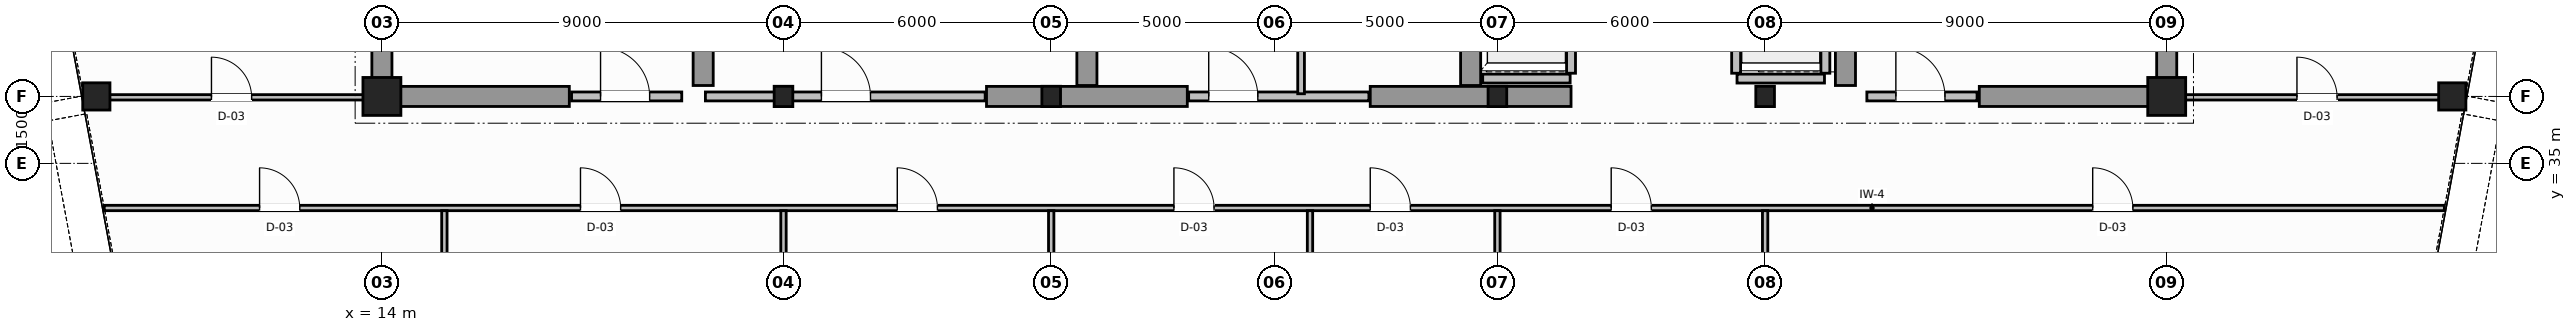
"""IFC4 building model, lengths in metres.
Left out: names, types, materials, properties, quantities, classifications, styles, units other than length and angle.
Written with IfcOpenShell. Run it as: python <this file> out.ifc"""

import sys

from ifc_helpers import new_model, si_unit, direction, frame, frame_2d, origin, origin_2d, place, context, subcontext, project, spatial, rectangle, hollow_circle, i_section, extrude, source, transform, mapped, element, fill, save


model = new_model("IFC4")
c1 = context("Model", 3, precision=1e-05, world=origin(), true_north=direction((0.0, 1.0)))
c2 = subcontext(c1, "Body", "Model", "MODEL_VIEW")
j1 = project(units=[si_unit("LENGTHUNIT", "METRE"), si_unit("PLANEANGLEUNIT", "RADIAN")], contexts=[c1])
p1 = place(None, origin())
s1 = spatial("IfcSite", under=j1, at=p1, CompositionType="ELEMENT")
p2 = place(p1, origin())
s2 = spatial("IfcBuilding", under=s1, at=p2, CompositionType="ELEMENT")
p3 = place(p2, frame((0.0, 0.0, 265.0)))
s3 = spatial("IfcBuildingStorey", under=s2, at=p3, CompositionType="ELEMENT", Elevation=265.0)
m1 = source(origin(), c2, "Body", "SweptSolid", [
    extrude(rectangle(XDim=0.85, YDim=0.85, at=origin_2d()), origin(), (0.0, 0.0, 1.0), 3.8),
])
p4 = place(p3, frame((14.0, 36.5, 0.0), z_axis=(0.0, 0.0, 1.0), x_axis=(1.0, 0.0, 0.0)))
e1 = element("IfcColumn", 1, at=p4, inside=s3, PredefinedType="COLUMN", context=c2, shape_type="MappedRepresentation", body=[
    mapped(m1, transform((0.0, 0.0, 0.0), scale=1.0)),
])
m2 = source(origin(), c2, "Body", "SweptSolid", [
    extrude(i_section(OverallWidth=0.418, OverallDepth=0.455, WebThickness=0.042, FlangeThickness=0.058, FilletRadius=0.015, at=origin_2d()), origin(), (0.0, 0.0, 1.0), 3.8),
])
for number, where, z_axis, x_axis in (
    (2, (23.0, 36.5, 0.0), (0.0, 0.0, 1.0), (1.0, 0.0, 0.0)),
    (3, (29.0, 36.5, 0.0), (0.0, 0.0, 1.0), (1.0, 0.0, 0.0)),
    (4, (39.0, 36.5, 0.0), (0.0, 0.0, 1.0), (1.0, 0.0, 0.0)),
    (5, (45.0, 36.5, 0.0), (0.0, 0.0, 1.0), (1.0, 0.0, 0.0)),
):
    element("IfcColumn", number, at=place(p3, frame(where, z_axis=z_axis, x_axis=x_axis)), inside=s3, PredefinedType="COLUMN", context=c2, shape_type="MappedRepresentation", body=[
        mapped(m2, transform((0.0, 0.0, 0.0), scale=1.0)),
    ])
p5 = place(p3, frame((54.0, 36.5, 0.0), z_axis=(0.0, 0.0, 1.0), x_axis=(1.0, 0.0, 0.0)))
e6 = element("IfcColumn", 6, at=p5, inside=s3, PredefinedType="COLUMN", context=c2, shape_type="MappedRepresentation", body=[
    mapped(m1, transform((0.0, 0.0, 0.0), scale=1.0)),
])
m3 = source(origin(), c2, "Body", "SweptSolid", [
    extrude(hollow_circle(Radius=0.305, WallThickness=0.03, at=origin_2d()), origin(), (0.0, 0.0, 1.0), 3.8),
])
for number, where, z_axis, x_axis in (
    (7, (7.6, 36.5, 0.0), (0.0, 0.0, 1.0), (1.0, 0.0, 0.0)),
    (8, (60.4, 36.5, 0.0), (0.0, 0.0, 1.0), (1.0, 0.0, 0.0)),
):
    element("IfcColumn", number, at=place(p3, frame(where, z_axis=z_axis, x_axis=x_axis)), inside=s3, PredefinedType="COLUMN", context=c2, shape_type="MappedRepresentation", body=[
        mapped(m3, transform((0.0, 0.0, 0.0), scale=1.0)),
    ])
for number, where, z_axis, x_axis in (
    (9, (14.0, 36.5, 0.0), (0.0, 0.0, 1.0), (0.0, 1.0, 0.0)),
    (10, (54.0, 36.5, 0.0), (0.0, 0.0, 1.0), (0.0, 1.0, 0.0)),
):
    element("IfcWall", number, at=place(p3, frame(where, z_axis=z_axis, x_axis=x_axis)), inside=s3, PredefinedType="SHEAR", context=c2, shape_type="SweptSolid", body=[
        extrude(rectangle(XDim=14.5, YDim=0.45, at=frame_2d((7.25, 0.0))), origin(), (0.0, 0.0, 1.0), 3.8),
    ])
p6 = place(p3, frame((14.245, 36.5, 0.0), z_axis=(0.0, 0.0, 1.0), x_axis=(1.0, 0.0, 0.0)))
e11 = element("IfcWall", 11, at=p6, inside=s3, PredefinedType="SHEAR", context=c2, shape_type="SweptSolid", body=[
    extrude(rectangle(XDim=3.955, YDim=0.45, at=frame_2d((1.978, 0.0))), origin(), (0.0, 0.0, 1.0), 2.58),
])
for number, where, z_axis, x_axis in (
    (12, (27.55, 36.5, 0.0), (0.0, 0.0, 1.0), (1.0, 0.0, 0.0)),
    (13, (36.15, 36.5, 0.0), (0.0, 0.0, 1.0), (1.0, 0.0, 0.0)),
):
    element("IfcWall", number, at=place(p3, frame(where, z_axis=z_axis, x_axis=x_axis)), inside=s3, PredefinedType="SHEAR", context=c2, shape_type="SweptSolid", body=[
        extrude(rectangle(XDim=4.5, YDim=0.45, at=frame_2d((2.25, 0.0))), origin(), (0.0, 0.0, 1.0), 3.8),
    ])
p7 = place(p3, frame((49.8, 36.5, 0.0), z_axis=(0.0, 0.0, 1.0), x_axis=(1.0, 0.0, 0.0)))
e14 = element("IfcWall", 14, at=p7, inside=s3, PredefinedType="SHEAR", context=c2, shape_type="SweptSolid", body=[
    extrude(rectangle(XDim=3.955, YDim=0.45, at=frame_2d((1.978, 0.0))), origin(), (0.0, 0.0, 1.0), 2.58),
])
for number, where, z_axis, x_axis in (
    (15, (21.2, 36.745, 0.0), (0.0, 0.0, 1.0), (0.0, 1.0, 0.0)),
    (16, (29.8, 36.745, 0.0), (0.0, 0.0, 1.0), (0.0, 1.0, 0.0)),
    (17, (38.4, 36.745, 0.0), (0.0, 0.0, 1.0), (0.0, 1.0, 0.0)),
    (18, (46.8, 36.745, 0.0), (0.0, 0.0, 1.0), (0.0, 1.0, 0.0)),
):
    element("IfcWall", number, at=place(p3, frame(where, z_axis=z_axis, x_axis=x_axis)), inside=s3, PredefinedType="SHEAR", context=c2, shape_type="SweptSolid", body=[
        extrude(rectangle(XDim=9.455, YDim=0.45, at=frame_2d((4.728, 0.0))), origin(), (0.0, 0.0, 1.0), 3.8),
    ])
p8 = place(p3, frame((18.25, 36.5, 0.0), z_axis=(0.0, 0.0, 1.0), x_axis=(1.0, 0.0, 0.0)))
e19 = element("IfcWall", 19, at=p8, inside=s3, PredefinedType="SOLIDWALL", context=c2, shape_type="SweptSolid", body=[
    extrude(rectangle(XDim=2.47, YDim=0.2, at=frame_2d((1.235, 0.0))), origin(), (0.0, 0.0, 1.0), 2.57),
])
p9 = place(p8, frame((0.65, 0.0, 0.0)))
e20 = element("IfcOpeningElement", 20, at=p9, cuts=e19, PredefinedType="OPENING", context=c2, shape_type="SweptSolid", body=[
    extrude(rectangle(XDim=1.1, YDim=2.15, at=frame_2d((0.55, 1.075))), frame((0.0, 0.11, 0.0), z_axis=(0.0, -1.0, 0.0), x_axis=(1.0, 0.0, 0.0)), (0.0, 0.0, 1.0), 0.22),
])
p10 = place(p3, frame((47.28, 36.5, 0.0), z_axis=(0.0, 0.0, 1.0), x_axis=(1.0, 0.0, 0.0)))
e21 = element("IfcWall", 21, at=p10, inside=s3, PredefinedType="SOLIDWALL", context=c2, shape_type="SweptSolid", body=[
    extrude(rectangle(XDim=2.47, YDim=0.2, at=frame_2d((1.235, 0.0))), origin(), (0.0, 0.0, 1.0), 2.57),
])
p11 = place(p10, frame((0.65, 0.0, 0.0)))
e22 = element("IfcOpeningElement", 22, at=p11, cuts=e21, PredefinedType="OPENING", context=c2, shape_type="SweptSolid", body=[
    extrude(rectangle(XDim=1.1, YDim=2.15, at=frame_2d((0.55, 1.075))), frame((0.0, 0.11, 0.0), z_axis=(0.0, -1.0, 0.0), x_axis=(1.0, 0.0, 0.0)), (0.0, 0.0, 1.0), 0.22),
])
p12 = place(p3, frame((38.67, 36.9, 0.0), z_axis=(0.0, 0.0, 1.0), x_axis=(1.0, 0.0, 0.0)))
e23 = element("IfcWall", 23, at=p12, inside=s3, PredefinedType="SOLIDWALL", context=c2, shape_type="SweptSolid", body=[
    extrude(rectangle(XDim=1.96, YDim=0.2, at=frame_2d((0.98, 0.0))), origin(), (0.0, 0.0, 1.0), 2.37),
])
p13 = place(p3, frame((40.65, 37.02, 0.0), z_axis=(0.0, 0.0, 1.0), x_axis=(0.0, 1.0, 0.0)))
e24 = element("IfcWall", 24, at=p13, inside=s3, PredefinedType="SOLIDWALL", context=c2, shape_type="SweptSolid", body=[
    extrude(rectangle(XDim=2.56, YDim=0.2, at=frame_2d((1.28, 0.0))), origin(), (0.0, 0.0, 1.0), 3.58),
])
p14 = place(p3, frame((44.37, 36.9, 0.0), z_axis=(0.0, 0.0, 1.0), x_axis=(1.0, 0.0, 0.0)))
e25 = element("IfcWall", 25, at=p14, inside=s3, PredefinedType="SOLIDWALL", context=c2, shape_type="SweptSolid", body=[
    extrude(rectangle(XDim=1.96, YDim=0.2, at=frame_2d((0.98, 0.0))), origin(), (0.0, 0.0, 1.0), 2.37),
])
for number, where, z_axis, x_axis in (
    (26, (44.35, 37.02, 0.0), (0.0, 0.0, 1.0), (0.0, 1.0, 0.0)),
    (27, (46.35, 37.02, 0.0), (0.0, 0.0, 1.0), (0.0, 1.0, 0.0)),
):
    element("IfcWall", number, at=place(p3, frame(where, z_axis=z_axis, x_axis=x_axis)), inside=s3, PredefinedType="SOLIDWALL", context=c2, shape_type="SweptSolid", body=[
        extrude(rectangle(XDim=2.56, YDim=0.2, at=frame_2d((1.28, 0.0))), origin(), (0.0, 0.0, 1.0), 3.58),
    ])
p15 = place(p3, frame((21.25, 36.5, 0.0), z_axis=(0.0, 0.0, 1.0), x_axis=(1.0, 0.0, 0.0)))
e28 = element("IfcWall", 28, at=p15, inside=s3, PredefinedType="SOLIDWALL", context=c2, shape_type="SweptSolid", body=[
    extrude(rectangle(XDim=6.27, YDim=0.2, at=frame_2d((3.135, 0.0))), origin(), (0.0, 0.0, 1.0), 2.37),
])
p16 = place(p15, frame((2.6, 0.0, 0.0)))
e29 = element("IfcOpeningElement", 29, at=p16, cuts=e28, PredefinedType="OPENING", context=c2, shape_type="SweptSolid", body=[
    extrude(rectangle(XDim=1.1, YDim=2.15, at=frame_2d((0.55, 1.075))), frame((0.0, 0.11, 0.0), z_axis=(0.0, -1.0, 0.0), x_axis=(1.0, 0.0, 0.0)), (0.0, 0.0, 1.0), 0.22),
])
p17 = place(p3, frame((32.08, 36.5, 0.0), z_axis=(0.0, 0.0, 1.0), x_axis=(1.0, 0.0, 0.0)))
e30 = element("IfcWall", 30, at=p17, inside=s3, PredefinedType="SOLIDWALL", context=c2, shape_type="SweptSolid", body=[
    extrude(rectangle(XDim=4.04, YDim=0.2, at=frame_2d((2.02, 0.0))), origin(), (0.0, 0.0, 1.0), 2.37),
])
p18 = place(p17, frame((0.45, 0.0, 0.0)))
e31 = element("IfcOpeningElement", 31, at=p18, cuts=e30, PredefinedType="OPENING", context=c2, shape_type="SweptSolid", body=[
    extrude(rectangle(XDim=1.1, YDim=2.15, at=frame_2d((0.55, 1.075))), frame((0.0, 0.11, 0.0), z_axis=(0.0, -1.0, 0.0), x_axis=(1.0, 0.0, 0.0)), (0.0, 0.0, 1.0), 0.22),
])
p19 = place(p3, frame((34.6, 36.56, 0.0), z_axis=(0.0, 0.0, 1.0), x_axis=(0.0, 1.0, 0.0)))
e32 = element("IfcWall", 32, at=p19, inside=s3, PredefinedType="PARTITIONING", context=c2, shape_type="SweptSolid", body=[
    extrude(rectangle(XDim=9.58, YDim=0.15, at=frame_2d((4.79, 0.0))), origin(), (0.0, 0.0, 1.0), 3.58),
])
p20 = place(p19, frame((4.2, 0.0, 0.0)))
e33 = element("IfcOpeningElement", 33, at=p20, cuts=e32, PredefinedType="OPENING", context=c2, shape_type="SweptSolid", body=[
    extrude(rectangle(XDim=0.9, YDim=2.1, at=frame_2d((0.45, 1.05))), frame((0.0, 0.085, 0.0), z_axis=(0.0, -1.0, 0.0), x_axis=(1.0, 0.0, 0.0)), (0.0, 0.0, 1.0), 0.17),
])
p21 = place(p3, frame((7.777, 34.0, 0.0), z_axis=(0.0, 0.0, 1.0), x_axis=(1.0, 0.0, 0.0)))
e34 = element("IfcWall", 34, at=p21, inside=s3, PredefinedType="PARTITIONING", context=c2, shape_type="SweptSolid", body=[
    extrude(rectangle(XDim=52.446, YDim=0.12, at=frame_2d((26.223, 0.0))), origin(), (0.0, 0.0, 1.0), 3.58),
])
p22 = place(p21, frame((3.481, 0.0, 0.0)))
e35 = element("IfcOpeningElement", 35, at=p22, cuts=e34, PredefinedType="OPENING", context=c2, shape_type="SweptSolid", body=[
    extrude(rectangle(XDim=0.9, YDim=2.15, at=frame_2d((0.45, 1.075))), frame((0.0, 0.07, 0.0), z_axis=(0.0, -1.0, 0.0), x_axis=(1.0, 0.0, 0.0)), (0.0, 0.0, 1.0), 0.14),
])
p23 = place(p21, frame((10.673, 0.0, 0.0)))
e36 = element("IfcOpeningElement", 36, at=p23, cuts=e34, PredefinedType="OPENING", context=c2, shape_type="SweptSolid", body=[
    extrude(rectangle(XDim=0.9, YDim=2.15, at=frame_2d((0.45, 1.075))), frame((0.0, 0.07, 0.0), z_axis=(0.0, -1.0, 0.0), x_axis=(1.0, 0.0, 0.0)), (0.0, 0.0, 1.0), 0.14),
])
p24 = place(p21, frame((17.773, 0.0, 0.0)))
e37 = element("IfcOpeningElement", 37, at=p24, cuts=e34, PredefinedType="OPENING", context=c2, shape_type="SweptSolid", body=[
    extrude(rectangle(XDim=0.9, YDim=2.15, at=frame_2d((0.45, 1.075))), frame((0.0, 0.07, 0.0), z_axis=(0.0, -1.0, 0.0), x_axis=(1.0, 0.0, 0.0)), (0.0, 0.0, 1.0), 0.14),
])
p25 = place(p21, frame((23.973, 0.0, 0.0)))
e38 = element("IfcOpeningElement", 38, at=p25, cuts=e34, PredefinedType="OPENING", context=c2, shape_type="SweptSolid", body=[
    extrude(rectangle(XDim=0.9, YDim=2.15, at=frame_2d((0.45, 1.075))), frame((0.0, 0.07, 0.0), z_axis=(0.0, -1.0, 0.0), x_axis=(1.0, 0.0, 0.0)), (0.0, 0.0, 1.0), 0.14),
])
p26 = place(p21, frame((28.373, 0.0, 0.0)))
e39 = element("IfcOpeningElement", 39, at=p26, cuts=e34, PredefinedType="OPENING", context=c2, shape_type="SweptSolid", body=[
    extrude(rectangle(XDim=0.9, YDim=2.15, at=frame_2d((0.45, 1.075))), frame((0.0, 0.07, 0.0), z_axis=(0.0, -1.0, 0.0), x_axis=(1.0, 0.0, 0.0)), (0.0, 0.0, 1.0), 0.14),
])
p27 = place(p21, frame((33.773, 0.0, 0.0)))
e40 = element("IfcOpeningElement", 40, at=p27, cuts=e34, PredefinedType="OPENING", context=c2, shape_type="SweptSolid", body=[
    extrude(rectangle(XDim=0.9, YDim=2.15, at=frame_2d((0.45, 1.075))), frame((0.0, 0.07, 0.0), z_axis=(0.0, -1.0, 0.0), x_axis=(1.0, 0.0, 0.0)), (0.0, 0.0, 1.0), 0.14),
])
p28 = place(p21, frame((44.564, 0.0, 0.0)))
e41 = element("IfcOpeningElement", 41, at=p28, cuts=e34, PredefinedType="OPENING", context=c2, shape_type="SweptSolid", body=[
    extrude(rectangle(XDim=0.9, YDim=2.15, at=frame_2d((0.45, 1.075))), frame((0.0, 0.07, 0.0), z_axis=(0.0, -1.0, 0.0), x_axis=(1.0, 0.0, 0.0)), (0.0, 0.0, 1.0), 0.14),
])
p29 = place(p3, frame((7.321, 36.48, 0.0), z_axis=(0.0, 0.0, 1.0), x_axis=(1.0, 0.0, 0.0)))
e42 = element("IfcWall", 42, at=p29, inside=s3, PredefinedType="PARTITIONING", context=c2, shape_type="SweptSolid", body=[
    extrude(rectangle(XDim=6.619, YDim=0.12, at=frame_2d((3.31, 0.0))), origin(), (0.0, 0.0, 1.0), 2.37),
])
p30 = place(p29, frame((2.859, 0.0, 0.0)))
e43 = element("IfcOpeningElement", 43, at=p30, cuts=e42, PredefinedType="OPENING", context=c2, shape_type="SweptSolid", body=[
    extrude(rectangle(XDim=0.9, YDim=2.15, at=frame_2d((0.45, 1.075))), frame((0.0, 0.07, 0.0), z_axis=(0.0, -1.0, 0.0), x_axis=(1.0, 0.0, 0.0)), (0.0, 0.0, 1.0), 0.14),
])
p31 = place(p3, frame((54.06, 36.48, 0.0), z_axis=(0.0, 0.0, 1.0), x_axis=(1.0, 0.0, 0.0)))
e44 = element("IfcWall", 44, at=p31, inside=s3, PredefinedType="PARTITIONING", context=c2, shape_type="SweptSolid", body=[
    extrude(rectangle(XDim=6.619, YDim=0.12, at=frame_2d((3.31, 0.0))), origin(), (0.0, 0.0, 1.0), 2.37),
])
p32 = place(p31, frame((2.859, 0.0, 0.0)))
e45 = element("IfcOpeningElement", 45, at=p32, cuts=e44, PredefinedType="OPENING", context=c2, shape_type="SweptSolid", body=[
    extrude(rectangle(XDim=0.9, YDim=2.15, at=frame_2d((0.45, 1.075))), frame((0.0, 0.07, 0.0), z_axis=(0.0, -1.0, 0.0), x_axis=(1.0, 0.0, 0.0)), (0.0, 0.0, 1.0), 0.14),
])
for number, where, z_axis, x_axis in (
    (46, (23.0, 28.14, 0.0), (0.0, 0.0, 1.0), (0.0, 1.0, 0.0)),
    (47, (29.0, 28.14, 0.0), (0.0, 0.0, 1.0), (0.0, 1.0, 0.0)),
    (48, (39.0, 28.14, 0.0), (0.0, 0.0, 1.0), (0.0, 1.0, 0.0)),
    (49, (45.0, 28.14, 0.0), (0.0, 0.0, 1.0), (0.0, 1.0, 0.0)),
):
    element("IfcWall", number, at=place(p3, frame(where, z_axis=z_axis, x_axis=x_axis)), inside=s3, PredefinedType="PARTITIONING", context=c2, shape_type="SweptSolid", body=[
        extrude(rectangle(XDim=5.8, YDim=0.12, at=frame_2d((2.9, 0.0))), origin(), (0.0, 0.0, 1.0), 2.37),
    ])
p33 = place(p3, frame((15.4, 18.64, 0.0), z_axis=(0.0, 0.0, 1.0), x_axis=(0.0, 1.0, 0.0)))
e50 = element("IfcWall", 50, at=p33, inside=s3, PredefinedType="PARTITIONING", context=c2, shape_type="SweptSolid", body=[
    extrude(rectangle(XDim=15.3, YDim=0.12, at=frame_2d((7.65, 0.0))), origin(), (0.0, 0.0, 1.0), 3.58),
])
p34 = place(p3, frame((34.8, 15.44, 0.0), z_axis=(0.0, 0.0, 1.0), x_axis=(0.0, 1.0, 0.0)))
e51 = element("IfcWall", 51, at=p34, inside=s3, PredefinedType="PARTITIONING", context=c2, shape_type="SweptSolid", body=[
    extrude(rectangle(XDim=18.5, YDim=0.12, at=frame_2d((9.25, 0.0))), origin(), (0.0, 0.0, 1.0), 3.58),
])
m4 = source(origin(), c2, "Body", "SweptSolid", [
    extrude(rectangle(XDim=1.1, YDim=2.15, at=frame_2d((0.55, 1.075))), frame((0.0, 0.025, 0.0), z_axis=(0.0, -1.0, 0.0), x_axis=(1.0, 0.0, 0.0)), (0.0, 0.0, 1.0), 0.05),
])
p35 = place(p9, origin())
e52 = element("IfcDoor", 52, at=p35, inside=s3, OperationType="SINGLE_SWING_RIGHT", PredefinedType="DOOR", context=c2, shape_type="MappedRepresentation", body=[
    mapped(m4, transform((0.0, 0.0, 0.0), scale=1.0)),
])
fill(e20, e52)
p36 = place(p11, origin())
e53 = element("IfcDoor", 53, at=p36, inside=s3, OperationType="SINGLE_SWING_LEFT", PredefinedType="DOOR", context=c2, shape_type="MappedRepresentation", body=[
    mapped(m4, transform((0.0, 0.0, 0.0), scale=1.0)),
])
fill(e22, e53)
p37 = place(p16, origin())
e54 = element("IfcDoor", 54, at=p37, inside=s3, OperationType="SINGLE_SWING_LEFT", PredefinedType="DOOR", context=c2, shape_type="MappedRepresentation", body=[
    mapped(m4, transform((0.0, 0.0, 0.0), scale=1.0)),
])
fill(e29, e54)
p38 = place(p18, origin())
e55 = element("IfcDoor", 55, at=p38, inside=s3, OperationType="SINGLE_SWING_LEFT", PredefinedType="DOOR", context=c2, shape_type="MappedRepresentation", body=[
    mapped(m4, transform((0.0, 0.0, 0.0), scale=1.0)),
])
fill(e31, e55)
m5 = source(origin(), c2, "Body", "SweptSolid", [
    extrude(rectangle(XDim=0.9, YDim=2.15, at=frame_2d((0.45, 1.075))), frame((0.0, 0.025, 0.0), z_axis=(0.0, -1.0, 0.0), x_axis=(1.0, 0.0, 0.0)), (0.0, 0.0, 1.0), 0.05),
])
p39 = place(p30, origin())
e56 = element("IfcDoor", 56, at=p39, inside=s3, OperationType="SINGLE_SWING_LEFT", PredefinedType="DOOR", context=c2, shape_type="MappedRepresentation", body=[
    mapped(m5, transform((0.0, 0.0, 0.0), scale=1.0)),
])
fill(e43, e56)
p40 = place(p32, origin())
e57 = element("IfcDoor", 57, at=p40, inside=s3, OperationType="SINGLE_SWING_RIGHT", PredefinedType="DOOR", context=c2, shape_type="MappedRepresentation", body=[
    mapped(m5, transform((0.0, 0.0, 0.0), scale=1.0)),
])
fill(e45, e57)
p41 = place(p22, origin())
e58 = element("IfcDoor", 58, at=p41, inside=s3, OperationType="SINGLE_SWING_LEFT", PredefinedType="DOOR", context=c2, shape_type="MappedRepresentation", body=[
    mapped(m5, transform((0.0, 0.0, 0.0), scale=1.0)),
])
fill(e35, e58)
p42 = place(p23, origin())
e59 = element("IfcDoor", 59, at=p42, inside=s3, OperationType="SINGLE_SWING_RIGHT", PredefinedType="DOOR", context=c2, shape_type="MappedRepresentation", body=[
    mapped(m5, transform((0.0, 0.0, 0.0), scale=1.0)),
])
fill(e36, e59)
p43 = place(p24, origin())
e60 = element("IfcDoor", 60, at=p43, inside=s3, OperationType="SINGLE_SWING_LEFT", PredefinedType="DOOR", context=c2, shape_type="MappedRepresentation", body=[
    mapped(m5, transform((0.0, 0.0, 0.0), scale=1.0)),
])
fill(e37, e60)
p44 = place(p25, origin())
e61 = element("IfcDoor", 61, at=p44, inside=s3, OperationType="SINGLE_SWING_RIGHT", PredefinedType="DOOR", context=c2, shape_type="MappedRepresentation", body=[
    mapped(m5, transform((0.0, 0.0, 0.0), scale=1.0)),
])
fill(e38, e61)
p45 = place(p26, origin())
e62 = element("IfcDoor", 62, at=p45, inside=s3, OperationType="SINGLE_SWING_LEFT", PredefinedType="DOOR", context=c2, shape_type="MappedRepresentation", body=[
    mapped(m5, transform((0.0, 0.0, 0.0), scale=1.0)),
])
fill(e39, e62)
p46 = place(p27, origin())
e63 = element("IfcDoor", 63, at=p46, inside=s3, OperationType="SINGLE_SWING_RIGHT", PredefinedType="DOOR", context=c2, shape_type="MappedRepresentation", body=[
    mapped(m5, transform((0.0, 0.0, 0.0), scale=1.0)),
])
fill(e40, e63)
p47 = place(p28, origin())
e64 = element("IfcDoor", 64, at=p47, inside=s3, OperationType="SINGLE_SWING_LEFT", PredefinedType="DOOR", context=c2, shape_type="MappedRepresentation", body=[
    mapped(m5, transform((0.0, 0.0, 0.0), scale=1.0)),
])
fill(e41, e64)
save(model, sys.argv[1])
